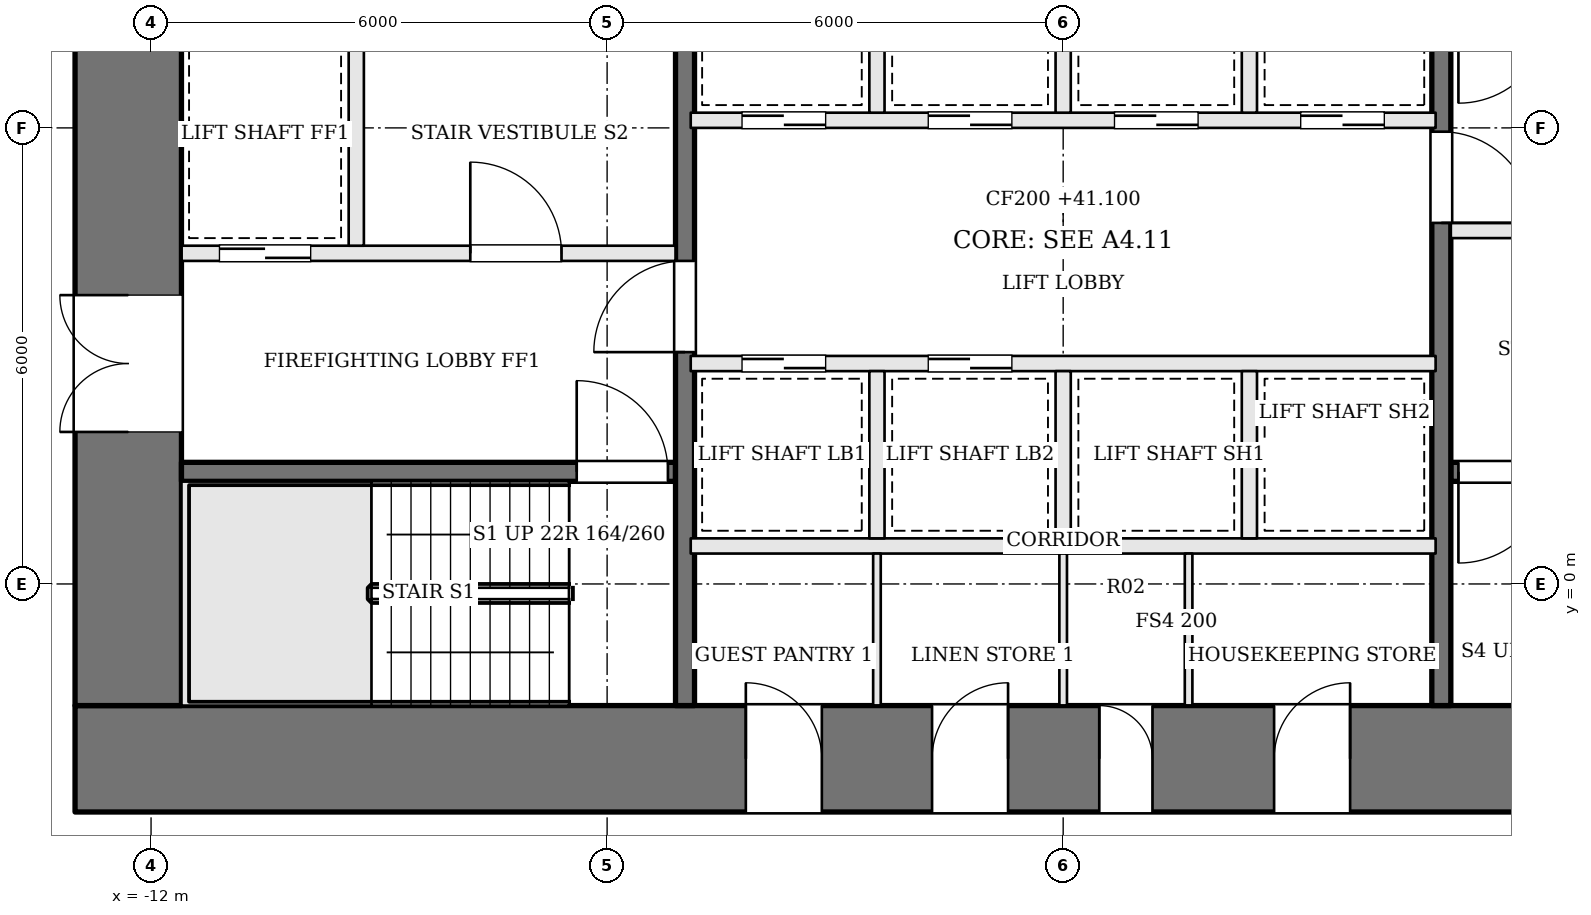
"""IFC4 building model, lengths in metres.
Left out: names, types, materials, properties, quantities, classifications, styles, units other than length and angle.
Written with IfcOpenShell. Run it as: python <this file> out.ifc"""

import sys

from ifc_helpers import new_model, si_unit, direction, frame, frame_2d, origin, place, context, subcontext, project, spatial, rectangle, extrude, element, fill, save


model = new_model("IFC4")
c1 = context("Model", 3, precision=1e-05, world=origin(), true_north=direction((0.0, 1.0)))
c2 = subcontext(c1, "Body", "Model", "MODEL_VIEW")
j1 = project(units=[si_unit("LENGTHUNIT", "METRE"), si_unit("PLANEANGLEUNIT", "RADIAN")], contexts=[c1])
p1 = place(None, origin())
s1 = spatial("IfcSite", under=j1, at=p1, CompositionType="ELEMENT")
p2 = place(p1, origin())
s2 = spatial("IfcBuilding", under=s1, at=p2, CompositionType="ELEMENT")
p3 = place(p2, frame((0.0, 0.0, 41.1)))
s3 = spatial("IfcBuildingStorey", under=s2, at=p3, CompositionType="ELEMENT", Elevation=41.1)
p4 = place(p3, frame((-13.0, -2.3, 0.0), z_axis=(0.0, 0.0, 1.0), x_axis=(1.0, 0.0, 0.0)))
e1 = element("IfcWall", 1, at=p4, inside=s3, PredefinedType="SHEAR", context=c2, shape_type="SweptSolid", body=[
    extrude(rectangle(XDim=26.0, YDim=1.4, at=frame_2d((13.0, 0.0))), origin(), (0.0, 0.0, 1.0), 3.6),
])
p5 = place(p4, frame((8.825, 0.0, 0.0)))
e2 = element("IfcOpeningElement", 2, at=p5, cuts=e1, PredefinedType="OPENING", context=c2, shape_type="SweptSolid", body=[
    extrude(rectangle(XDim=1.0, YDim=2.1, at=frame_2d((0.5, 1.05))), frame((0.0, 0.71, 0.0), z_axis=(0.0, -1.0, 0.0), x_axis=(1.0, 0.0, 0.0)), (0.0, 0.0, 1.0), 1.42),
])
p6 = place(p4, frame((11.275, 0.0, 0.0)))
e3 = element("IfcOpeningElement", 3, at=p6, cuts=e1, PredefinedType="OPENING", context=c2, shape_type="SweptSolid", body=[
    extrude(rectangle(XDim=1.0, YDim=2.1, at=frame_2d((0.5, 1.05))), frame((0.0, 0.71, 0.0), z_axis=(0.0, -1.0, 0.0), x_axis=(1.0, 0.0, 0.0)), (0.0, 0.0, 1.0), 1.42),
])
p7 = place(p4, frame((13.475, 0.0, 0.0)))
e4 = element("IfcOpeningElement", 4, at=p7, cuts=e1, PredefinedType="OPENING", context=c2, shape_type="SweptSolid", body=[
    extrude(rectangle(XDim=0.7, YDim=2.1, at=frame_2d((0.35, 1.05))), frame((0.0, 0.71, 0.0), z_axis=(0.0, -1.0, 0.0), x_axis=(1.0, 0.0, 0.0)), (0.0, 0.0, 1.0), 1.42),
])
p8 = place(p4, frame((15.775, 0.0, 0.0)))
e5 = element("IfcOpeningElement", 5, at=p8, cuts=e1, PredefinedType="OPENING", context=c2, shape_type="SweptSolid", body=[
    extrude(rectangle(XDim=1.0, YDim=2.1, at=frame_2d((0.5, 1.05))), frame((0.0, 0.71, 0.0), z_axis=(0.0, -1.0, 0.0), x_axis=(1.0, 0.0, 0.0)), (0.0, 0.0, 1.0), 1.42),
])
p9 = place(p3, frame((-12.3, -1.6, 0.0), z_axis=(0.0, 0.0, 1.0), x_axis=(0.0, 1.0, 0.0)))
e6 = element("IfcWall", 6, at=p9, inside=s3, PredefinedType="SHEAR", context=c2, shape_type="SweptSolid", body=[
    extrude(rectangle(XDim=12.2, YDim=1.4, at=frame_2d((6.1, 0.0))), origin(), (0.0, 0.0, 1.0), 3.6),
])
p10 = place(p9, frame((3.6, 0.0, 0.0)))
e7 = element("IfcOpeningElement", 7, at=p10, cuts=e6, PredefinedType="OPENING", context=c2, shape_type="SweptSolid", body=[
    extrude(rectangle(XDim=1.8, YDim=2.1, at=frame_2d((0.9, 1.05))), frame((0.0, 0.71, 0.0), z_axis=(0.0, -1.0, 0.0), x_axis=(1.0, 0.0, 0.0)), (0.0, 0.0, 1.0), 1.42),
])
p11 = place(p3, frame((-11.6, 1.475, 0.0), z_axis=(0.0, 0.0, 1.0), x_axis=(1.0, 0.0, 0.0)))
e8 = element("IfcWall", 8, at=p11, inside=s3, PredefinedType="SOLIDWALL", context=c2, shape_type="SweptSolid", body=[
    extrude(rectangle(XDim=6.5, YDim=0.25, at=frame_2d((3.25, 0.0))), origin(), (0.0, 0.0, 1.0), 3.4),
])
p12 = place(p11, frame((5.2, 0.0, 0.0)))
e9 = element("IfcOpeningElement", 9, at=p12, cuts=e8, PredefinedType="OPENING", context=c2, shape_type="SweptSolid", body=[
    extrude(rectangle(XDim=1.2, YDim=2.1, at=frame_2d((0.6, 1.05))), frame((0.0, 0.135, 0.0), z_axis=(0.0, -1.0, 0.0), x_axis=(1.0, 0.0, 0.0)), (0.0, 0.0, 1.0), 0.27),
])
p13 = place(p3, frame((-11.6, 4.35, 0.0), z_axis=(0.0, 0.0, 1.0), x_axis=(1.0, 0.0, 0.0)))
e10 = element("IfcWall", 10, at=p13, inside=s3, PredefinedType="SOLIDWALL", context=c2, shape_type="SweptSolid", body=[
    extrude(rectangle(XDim=6.5, YDim=0.2, at=frame_2d((3.25, 0.0))), origin(), (0.0, 0.0, 1.0), 3.4),
])
p14 = place(p13, frame((3.8, 0.0, 0.0)))
e11 = element("IfcOpeningElement", 11, at=p14, cuts=e10, PredefinedType="OPENING", context=c2, shape_type="SweptSolid", body=[
    extrude(rectangle(XDim=1.2, YDim=2.1, at=frame_2d((0.6, 1.05))), frame((0.0, 0.11, 0.0), z_axis=(0.0, -1.0, 0.0), x_axis=(1.0, 0.0, 0.0)), (0.0, 0.0, 1.0), 0.22),
])
p15 = place(p13, frame((0.5, 0.0, 0.0)))
e12 = element("IfcOpeningElement", 12, at=p15, cuts=e10, PredefinedType="OPENING", context=c2, shape_type="SweptSolid", body=[
    extrude(rectangle(XDim=1.2, YDim=2.1, at=frame_2d((0.6, 1.05))), frame((0.0, 0.11, 0.0), z_axis=(0.0, -1.0, 0.0), x_axis=(1.0, 0.0, 0.0)), (0.0, 0.0, 1.0), 0.22),
])
p16 = place(p3, frame((11.6, 4.65, 0.0), z_axis=(0.0, 0.0, 1.0), x_axis=(-1.0, 0.0, 0.0)))
e13 = element("IfcWall", 13, at=p16, inside=s3, PredefinedType="SOLIDWALL", context=c2, shape_type="SweptSolid", body=[
    extrude(rectangle(XDim=6.5, YDim=0.2, at=frame_2d((3.25, 0.0))), origin(), (0.0, 0.0, 1.0), 3.4),
])
p17 = place(p16, frame((3.8, 0.0, 0.0)))
e14 = element("IfcOpeningElement", 14, at=p17, cuts=e13, PredefinedType="OPENING", context=c2, shape_type="SweptSolid", body=[
    extrude(rectangle(XDim=1.2, YDim=2.1, at=frame_2d((0.6, 1.05))), frame((0.0, 0.11, 0.0), z_axis=(0.0, -1.0, 0.0), x_axis=(1.0, 0.0, 0.0)), (0.0, 0.0, 1.0), 0.22),
])
p18 = place(p16, frame((0.5, 0.0, 0.0)))
e15 = element("IfcOpeningElement", 15, at=p18, cuts=e13, PredefinedType="OPENING", context=c2, shape_type="SweptSolid", body=[
    extrude(rectangle(XDim=1.2, YDim=2.1, at=frame_2d((0.6, 1.05))), frame((0.0, 0.11, 0.0), z_axis=(0.0, -1.0, 0.0), x_axis=(1.0, 0.0, 0.0)), (0.0, 0.0, 1.0), 0.22),
])
p19 = place(p3, frame((11.6, 1.475, 0.0), z_axis=(0.0, 0.0, 1.0), x_axis=(-1.0, 0.0, 0.0)))
e16 = element("IfcWall", 16, at=p19, inside=s3, PredefinedType="SOLIDWALL", context=c2, shape_type="SweptSolid", body=[
    extrude(rectangle(XDim=6.5, YDim=0.25, at=frame_2d((3.25, 0.0))), origin(), (0.0, 0.0, 1.0), 3.4),
])
p20 = place(p19, frame((5.2, 0.0, 0.0)))
e17 = element("IfcOpeningElement", 17, at=p20, cuts=e16, PredefinedType="OPENING", context=c2, shape_type="SweptSolid", body=[
    extrude(rectangle(XDim=1.2, YDim=2.1, at=frame_2d((0.6, 1.05))), frame((0.0, 0.135, 0.0), z_axis=(0.0, -1.0, 0.0), x_axis=(1.0, 0.0, 0.0)), (0.0, 0.0, 1.0), 0.27),
])
p21 = place(p3, frame((-9.3, 4.45, 0.0), z_axis=(0.0, 0.0, 1.0), x_axis=(0.0, 1.0, 0.0)))
e18 = element("IfcWall", 18, at=p21, inside=s3, PredefinedType="SOLIDWALL", context=c2, shape_type="SweptSolid", body=[
    extrude(rectangle(XDim=3.0, YDim=0.2, at=frame_2d((1.5, 0.0))), origin(), (0.0, 0.0, 1.0), 3.4),
])
p22 = place(p3, frame((-4.975, -1.6, 0.0), z_axis=(0.0, 0.0, 1.0), x_axis=(0.0, 1.0, 0.0)))
e19 = element("IfcWall", 19, at=p22, inside=s3, PredefinedType="SOLIDWALL", context=c2, shape_type="SweptSolid", body=[
    extrude(rectangle(XDim=12.2, YDim=0.25, at=frame_2d((6.1, 0.0))), origin(), (0.0, 0.0, 1.0), 3.4),
])
p23 = place(p22, frame((4.65, 0.0, 0.0)))
e20 = element("IfcOpeningElement", 20, at=p23, cuts=e19, PredefinedType="OPENING", context=c2, shape_type="SweptSolid", body=[
    extrude(rectangle(XDim=1.2, YDim=2.1, at=frame_2d((0.6, 1.05))), frame((0.0, 0.135, 0.0), z_axis=(0.0, -1.0, 0.0), x_axis=(1.0, 0.0, 0.0)), (0.0, 0.0, 1.0), 0.27),
])
p24 = place(p3, frame((4.975, 10.6, 0.0), z_axis=(0.0, 0.0, 1.0), x_axis=(0.0, -1.0, 0.0)))
e21 = element("IfcWall", 21, at=p24, inside=s3, PredefinedType="SOLIDWALL", context=c2, shape_type="SweptSolid", body=[
    extrude(rectangle(XDim=12.2, YDim=0.25, at=frame_2d((6.1, 0.0))), origin(), (0.0, 0.0, 1.0), 3.4),
])
p25 = place(p24, frame((4.65, 0.0, 0.0)))
e22 = element("IfcOpeningElement", 22, at=p25, cuts=e21, PredefinedType="OPENING", context=c2, shape_type="SweptSolid", body=[
    extrude(rectangle(XDim=1.2, YDim=2.1, at=frame_2d((0.6, 1.05))), frame((0.0, 0.135, 0.0), z_axis=(0.0, -1.0, 0.0), x_axis=(1.0, 0.0, 0.0)), (0.0, 0.0, 1.0), 0.27),
])
p26 = place(p3, frame((-4.9, 0.5, 0.0), z_axis=(0.0, 0.0, 1.0), x_axis=(1.0, 0.0, 0.0)))
e23 = element("IfcWall", 23, at=p26, inside=s3, PredefinedType="SOLIDWALL", context=c2, shape_type="SweptSolid", body=[
    extrude(rectangle(XDim=9.8, YDim=0.2, at=frame_2d((4.9, 0.0))), origin(), (0.0, 0.0, 1.0), 3.4),
])
p27 = place(p3, frame((-4.9, 2.9, 0.0), z_axis=(0.0, 0.0, 1.0), x_axis=(1.0, 0.0, 0.0)))
e24 = element("IfcWall", 24, at=p27, inside=s3, PredefinedType="SOLIDWALL", context=c2, shape_type="SweptSolid", body=[
    extrude(rectangle(XDim=9.8, YDim=0.2, at=frame_2d((4.9, 0.0))), origin(), (0.0, 0.0, 1.0), 3.4),
])
p28 = place(p27, frame((0.675, 0.0, 0.0)))
e25 = element("IfcOpeningElement", 25, at=p28, cuts=e24, PredefinedType="OPENING", context=c2, shape_type="SweptSolid", body=[
    extrude(rectangle(XDim=1.1, YDim=2.1, at=frame_2d((0.55, 1.05))), frame((0.0, 0.11, 0.0), z_axis=(0.0, -1.0, 0.0), x_axis=(1.0, 0.0, 0.0)), (0.0, 0.0, 1.0), 0.22),
])
p29 = place(p27, frame((3.125, 0.0, 0.0)))
e26 = element("IfcOpeningElement", 26, at=p29, cuts=e24, PredefinedType="OPENING", context=c2, shape_type="SweptSolid", body=[
    extrude(rectangle(XDim=1.1, YDim=2.1, at=frame_2d((0.55, 1.05))), frame((0.0, 0.11, 0.0), z_axis=(0.0, -1.0, 0.0), x_axis=(1.0, 0.0, 0.0)), (0.0, 0.0, 1.0), 0.22),
])
p30 = place(p3, frame((-4.9, 6.1, 0.0), z_axis=(0.0, 0.0, 1.0), x_axis=(1.0, 0.0, 0.0)))
e27 = element("IfcWall", 27, at=p30, inside=s3, PredefinedType="SOLIDWALL", context=c2, shape_type="SweptSolid", body=[
    extrude(rectangle(XDim=9.8, YDim=0.2, at=frame_2d((4.9, 0.0))), origin(), (0.0, 0.0, 1.0), 3.4),
])
p31 = place(p30, frame((0.675, 0.0, 0.0)))
e28 = element("IfcOpeningElement", 28, at=p31, cuts=e27, PredefinedType="OPENING", context=c2, shape_type="SweptSolid", body=[
    extrude(rectangle(XDim=1.1, YDim=2.1, at=frame_2d((0.55, 1.05))), frame((0.0, 0.11, 0.0), z_axis=(0.0, -1.0, 0.0), x_axis=(1.0, 0.0, 0.0)), (0.0, 0.0, 1.0), 0.22),
])
p32 = place(p30, frame((3.125, 0.0, 0.0)))
e29 = element("IfcOpeningElement", 29, at=p32, cuts=e27, PredefinedType="OPENING", context=c2, shape_type="SweptSolid", body=[
    extrude(rectangle(XDim=1.1, YDim=2.1, at=frame_2d((0.55, 1.05))), frame((0.0, 0.11, 0.0), z_axis=(0.0, -1.0, 0.0), x_axis=(1.0, 0.0, 0.0)), (0.0, 0.0, 1.0), 0.22),
])
p33 = place(p30, frame((5.575, 0.0, 0.0)))
e30 = element("IfcOpeningElement", 30, at=p33, cuts=e27, PredefinedType="OPENING", context=c2, shape_type="SweptSolid", body=[
    extrude(rectangle(XDim=1.1, YDim=2.1, at=frame_2d((0.55, 1.05))), frame((0.0, 0.11, 0.0), z_axis=(0.0, -1.0, 0.0), x_axis=(1.0, 0.0, 0.0)), (0.0, 0.0, 1.0), 0.22),
])
p34 = place(p30, frame((8.025, 0.0, 0.0)))
e31 = element("IfcOpeningElement", 31, at=p34, cuts=e27, PredefinedType="OPENING", context=c2, shape_type="SweptSolid", body=[
    extrude(rectangle(XDim=1.1, YDim=2.1, at=frame_2d((0.55, 1.05))), frame((0.0, 0.11, 0.0), z_axis=(0.0, -1.0, 0.0), x_axis=(1.0, 0.0, 0.0)), (0.0, 0.0, 1.0), 0.22),
])
for number, where, z_axis, x_axis in (
    (32, (-2.45, 0.6, 0.0), (0.0, 0.0, 1.0), (0.0, 1.0, 0.0)),
    (33, (0.0, 0.6, 0.0), (0.0, 0.0, 1.0), (0.0, 1.0, 0.0)),
    (34, (2.45, 0.6, 0.0), (0.0, 0.0, 1.0), (0.0, 1.0, 0.0)),
    (35, (-2.45, 6.2, 0.0), (0.0, 0.0, 1.0), (0.0, 1.0, 0.0)),
    (36, (0.0, 6.2, 0.0), (0.0, 0.0, 1.0), (0.0, 1.0, 0.0)),
    (37, (2.45, 6.2, 0.0), (0.0, 0.0, 1.0), (0.0, 1.0, 0.0)),
):
    element("IfcWall", number, at=place(p3, frame(where, z_axis=z_axis, x_axis=x_axis)), inside=s3, PredefinedType="SOLIDWALL", context=c2, shape_type="SweptSolid", body=[
        extrude(rectangle(XDim=2.2, YDim=0.2, at=frame_2d((1.1, 0.0))), origin(), (0.0, 0.0, 1.0), 3.4),
    ])
for number, where, z_axis, x_axis in (
    (38, (-2.45, -1.6, 0.0), (0.0, 0.0, 1.0), (0.0, 1.0, 0.0)),
    (39, (0.0, -1.6, 0.0), (0.0, 0.0, 1.0), (0.0, 1.0, 0.0)),
    (40, (1.65, -1.6, 0.0), (0.0, 0.0, 1.0), (0.0, 1.0, 0.0)),
):
    element("IfcWall", number, at=place(p3, frame(where, z_axis=z_axis, x_axis=x_axis)), inside=s3, PredefinedType="PARTITIONING", context=c2, shape_type="SweptSolid", body=[
        extrude(rectangle(XDim=2.0, YDim=0.1, at=frame_2d((1.0, 0.0))), origin(), (0.0, 0.0, 1.0), 3.4),
    ])
p35 = place(p10, origin())
e41 = element("IfcDoor", 41, at=p35, inside=s3, OperationType="DOUBLE_DOOR_SINGLE_SWING", PredefinedType="DOOR", context=c2, shape_type="SweptSolid", body=[
    extrude(rectangle(XDim=1.8, YDim=2.1, at=frame_2d((0.9, 1.05))), frame((0.0, 0.025, 0.0), z_axis=(0.0, -1.0, 0.0), x_axis=(1.0, 0.0, 0.0)), (0.0, 0.0, 1.0), 0.05),
])
fill(e7, e41)
p36 = place(p23, origin())
e42 = element("IfcDoor", 42, at=p36, inside=s3, OperationType="SINGLE_SWING_LEFT", PredefinedType="DOOR", context=c2, shape_type="SweptSolid", body=[
    extrude(rectangle(XDim=1.2, YDim=2.1, at=frame_2d((0.6, 1.05))), frame((0.0, 0.025, 0.0), z_axis=(0.0, -1.0, 0.0), x_axis=(1.0, 0.0, 0.0)), (0.0, 0.0, 1.0), 0.05),
])
fill(e20, e42)
p37 = place(p25, origin())
e43 = element("IfcDoor", 43, at=p37, inside=s3, OperationType="SINGLE_SWING_RIGHT", PredefinedType="DOOR", context=c2, shape_type="SweptSolid", body=[
    extrude(rectangle(XDim=1.2, YDim=2.1, at=frame_2d((0.6, 1.05))), frame((0.0, 0.025, 0.0), z_axis=(0.0, -1.0, 0.0), x_axis=(1.0, 0.0, 0.0)), (0.0, 0.0, 1.0), 0.05),
])
fill(e22, e43)
p38 = place(p14, origin())
e44 = element("IfcDoor", 44, at=p38, inside=s3, OperationType="SINGLE_SWING_LEFT", PredefinedType="DOOR", context=c2, shape_type="SweptSolid", body=[
    extrude(rectangle(XDim=1.2, YDim=2.1, at=frame_2d((0.6, 1.05))), frame((0.0, 0.025, 0.0), z_axis=(0.0, -1.0, 0.0), x_axis=(1.0, 0.0, 0.0)), (0.0, 0.0, 1.0), 0.05),
])
fill(e11, e44)
p39 = place(p12, origin())
e45 = element("IfcDoor", 45, at=p39, inside=s3, OperationType="SINGLE_SWING_LEFT", PredefinedType="DOOR", context=c2, shape_type="SweptSolid", body=[
    extrude(rectangle(XDim=1.2, YDim=2.1, at=frame_2d((0.6, 1.05))), frame((0.0, 0.025, 0.0), z_axis=(0.0, -1.0, 0.0), x_axis=(1.0, 0.0, 0.0)), (0.0, 0.0, 1.0), 0.05),
])
fill(e9, e45)
p40 = place(p20, origin())
e46 = element("IfcDoor", 46, at=p40, inside=s3, OperationType="SINGLE_SWING_RIGHT", PredefinedType="DOOR", context=c2, shape_type="SweptSolid", body=[
    extrude(rectangle(XDim=1.2, YDim=2.1, at=frame_2d((0.6, 1.05))), frame((0.0, 0.025, 0.0), z_axis=(0.0, -1.0, 0.0), x_axis=(1.0, 0.0, 0.0)), (0.0, 0.0, 1.0), 0.05),
])
fill(e17, e46)
p41 = place(p15, origin())
e47 = element("IfcDoor", 47, at=p41, inside=s3, OperationType="SLIDING_TO_RIGHT", PredefinedType="DOOR", context=c2, shape_type="SweptSolid", body=[
    extrude(rectangle(XDim=1.2, YDim=2.1, at=frame_2d((0.6, 1.05))), frame((0.0, 0.025, 0.0), z_axis=(0.0, -1.0, 0.0), x_axis=(1.0, 0.0, 0.0)), (0.0, 0.0, 1.0), 0.05),
])
fill(e12, e47)
p42 = place(p28, origin())
e48 = element("IfcDoor", 48, at=p42, inside=s3, OperationType="SLIDING_TO_RIGHT", PredefinedType="DOOR", context=c2, shape_type="SweptSolid", body=[
    extrude(rectangle(XDim=1.1, YDim=2.1, at=frame_2d((0.55, 1.05))), frame((0.0, 0.025, 0.0), z_axis=(0.0, -1.0, 0.0), x_axis=(1.0, 0.0, 0.0)), (0.0, 0.0, 1.0), 0.05),
])
fill(e25, e48)
p43 = place(p29, origin())
e49 = element("IfcDoor", 49, at=p43, inside=s3, OperationType="SLIDING_TO_LEFT", PredefinedType="DOOR", context=c2, shape_type="SweptSolid", body=[
    extrude(rectangle(XDim=1.1, YDim=2.1, at=frame_2d((0.55, 1.05))), frame((0.0, 0.025, 0.0), z_axis=(0.0, -1.0, 0.0), x_axis=(1.0, 0.0, 0.0)), (0.0, 0.0, 1.0), 0.05),
])
fill(e26, e49)
p44 = place(p31, origin())
e50 = element("IfcDoor", 50, at=p44, inside=s3, OperationType="SLIDING_TO_RIGHT", PredefinedType="DOOR", context=c2, shape_type="SweptSolid", body=[
    extrude(rectangle(XDim=1.1, YDim=2.1, at=frame_2d((0.55, 1.05))), frame((0.0, 0.025, 0.0), z_axis=(0.0, -1.0, 0.0), x_axis=(1.0, 0.0, 0.0)), (0.0, 0.0, 1.0), 0.05),
])
fill(e28, e50)
p45 = place(p32, origin())
e51 = element("IfcDoor", 51, at=p45, inside=s3, OperationType="SLIDING_TO_LEFT", PredefinedType="DOOR", context=c2, shape_type="SweptSolid", body=[
    extrude(rectangle(XDim=1.1, YDim=2.1, at=frame_2d((0.55, 1.05))), frame((0.0, 0.025, 0.0), z_axis=(0.0, -1.0, 0.0), x_axis=(1.0, 0.0, 0.0)), (0.0, 0.0, 1.0), 0.05),
])
fill(e29, e51)
p46 = place(p33, origin())
e52 = element("IfcDoor", 52, at=p46, inside=s3, OperationType="SLIDING_TO_RIGHT", PredefinedType="DOOR", context=c2, shape_type="SweptSolid", body=[
    extrude(rectangle(XDim=1.1, YDim=2.1, at=frame_2d((0.55, 1.05))), frame((0.0, 0.025, 0.0), z_axis=(0.0, -1.0, 0.0), x_axis=(1.0, 0.0, 0.0)), (0.0, 0.0, 1.0), 0.05),
])
fill(e30, e52)
p47 = place(p34, origin())
e53 = element("IfcDoor", 53, at=p47, inside=s3, OperationType="SLIDING_TO_LEFT", PredefinedType="DOOR", context=c2, shape_type="SweptSolid", body=[
    extrude(rectangle(XDim=1.1, YDim=2.1, at=frame_2d((0.55, 1.05))), frame((0.0, 0.025, 0.0), z_axis=(0.0, -1.0, 0.0), x_axis=(1.0, 0.0, 0.0)), (0.0, 0.0, 1.0), 0.05),
])
fill(e31, e53)
p48 = place(p5, origin())
e54 = element("IfcDoor", 54, at=p48, inside=s3, OperationType="SINGLE_SWING_LEFT", PredefinedType="DOOR", context=c2, shape_type="SweptSolid", body=[
    extrude(rectangle(XDim=1.0, YDim=2.1, at=frame_2d((0.5, 1.05))), frame((0.0, 0.025, 0.0), z_axis=(0.0, -1.0, 0.0), x_axis=(1.0, 0.0, 0.0)), (0.0, 0.0, 1.0), 0.05),
])
fill(e2, e54)
p49 = place(p6, origin())
e55 = element("IfcDoor", 55, at=p49, inside=s3, OperationType="SINGLE_SWING_RIGHT", PredefinedType="DOOR", context=c2, shape_type="SweptSolid", body=[
    extrude(rectangle(XDim=1.0, YDim=2.1, at=frame_2d((0.5, 1.05))), frame((0.0, 0.025, 0.0), z_axis=(0.0, -1.0, 0.0), x_axis=(1.0, 0.0, 0.0)), (0.0, 0.0, 1.0), 0.05),
])
fill(e3, e55)
p50 = place(p7, origin())
e56 = element("IfcDoor", 56, at=p50, inside=s3, OperationType="SINGLE_SWING_LEFT", PredefinedType="DOOR", context=c2, shape_type="SweptSolid", body=[
    extrude(rectangle(XDim=0.7, YDim=2.1, at=frame_2d((0.35, 1.05))), frame((0.0, 0.025, 0.0), z_axis=(0.0, -1.0, 0.0), x_axis=(1.0, 0.0, 0.0)), (0.0, 0.0, 1.0), 0.05),
])
fill(e4, e56)
p51 = place(p8, origin())
e57 = element("IfcDoor", 57, at=p51, inside=s3, OperationType="SINGLE_SWING_RIGHT", PredefinedType="DOOR", context=c2, shape_type="SweptSolid", body=[
    extrude(rectangle(XDim=1.0, YDim=2.1, at=frame_2d((0.5, 1.05))), frame((0.0, 0.025, 0.0), z_axis=(0.0, -1.0, 0.0), x_axis=(1.0, 0.0, 0.0)), (0.0, 0.0, 1.0), 0.05),
])
fill(e5, e57)
save(model, sys.argv[1])
